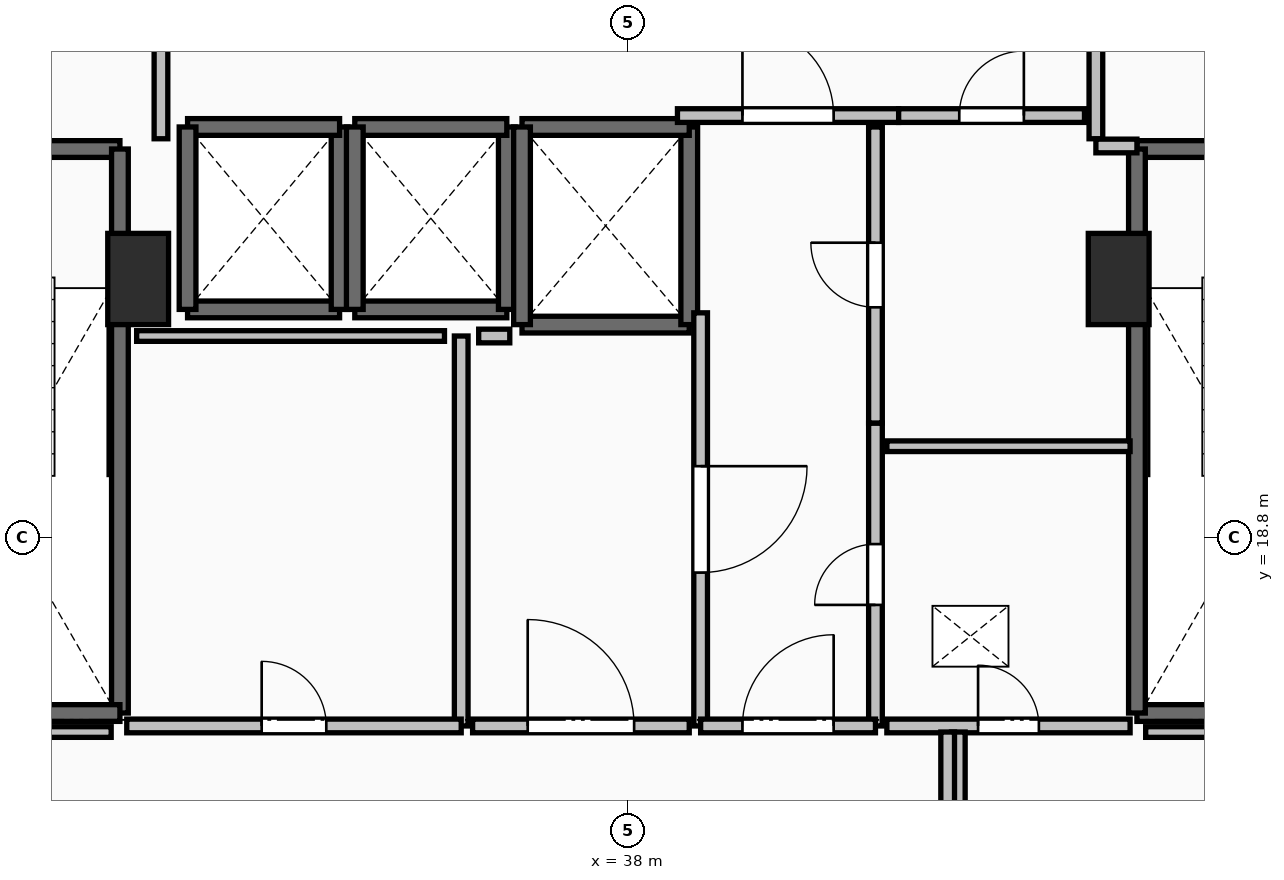
"""IFC4 building model, lengths in metres.
Left out: names, types, materials, properties, quantities, classifications, styles, units other than length and angle.
Written with IfcOpenShell. Run it as: python <this file> out.ifc"""

import sys

from ifc_helpers import new_model, si_unit, direction, frame, frame_2d, origin, origin_2d, place, context, subcontext, project, spatial, rectangle, extrude, element, fill, save


model = new_model("IFC4")
c1 = context("Model", 3, precision=1e-05, world=origin(), true_north=direction((0.0, 1.0)))
c2 = subcontext(c1, "Body", "Model", "MODEL_VIEW")
j1 = project(units=[si_unit("LENGTHUNIT", "METRE"), si_unit("PLANEANGLEUNIT", "RADIAN")], contexts=[c1])
p1 = place(None, origin())
s1 = spatial("IfcSite", under=j1, at=p1, CompositionType="ELEMENT")
p2 = place(p1, origin())
s2 = spatial("IfcBuilding", under=s1, at=p2, CompositionType="ELEMENT")
p3 = place(p2, frame((0.0, 0.0, 106.8)))
s3 = spatial("IfcBuildingStorey", under=s2, at=p3, CompositionType="ELEMENT", Elevation=106.8)
for number, where, z_axis, x_axis in (
    (1, (31.55, 22.2, 0.0), (0.0, 0.0, 1.0), (1.0, 0.0, 0.0)),
    (2, (44.45, 22.2, 0.0), (0.0, 0.0, 1.0), (1.0, 0.0, 0.0)),
):
    element("IfcColumn", number, at=place(p3, frame(where, z_axis=z_axis, x_axis=x_axis)), inside=s3, PredefinedType="PILASTER", context=c2, shape_type="SweptSolid", body=[
        extrude(rectangle(XDim=0.8, YDim=1.2, at=origin_2d()), origin(), (0.0, 0.0, 1.0), 3.5),
    ])
p4 = place(p3, frame((27.94, 23.91, 0.0), z_axis=(0.0, 0.0, 1.0), x_axis=(1.0, 0.0, 0.0)))
e3 = element("IfcWall", 3, at=p4, inside=s3, PredefinedType="SOLIDWALL", context=c2, shape_type="SweptSolid", body=[
    extrude(rectangle(XDim=3.37, YDim=0.22, at=frame_2d((1.685, 0.0))), origin(), (0.0, 0.0, 1.0), 3.24),
])
p5 = place(p4, frame((1.135, 0.0, 0.0)))
e4 = element("IfcOpeningElement", 4, at=p5, cuts=e3, PredefinedType="OPENING", context=c2, shape_type="SweptSolid", body=[
    extrude(rectangle(XDim=1.1, YDim=2.15, at=frame_2d((0.55, 1.075))), frame((0.0, 0.125, 0.0), z_axis=(0.0, -1.0, 0.0), x_axis=(1.0, 0.0, 0.0)), (0.0, 0.0, 1.0), 0.25),
])
p6 = place(p3, frame((31.31, 23.91, 0.0), z_axis=(0.0, 0.0, 1.0), x_axis=(0.0, -1.0, 0.0)))
e5 = element("IfcWall", 5, at=p6, inside=s3, PredefinedType="SOLIDWALL", context=c2, shape_type="SweptSolid", body=[
    extrude(rectangle(XDim=7.42, YDim=0.22, at=frame_2d((3.71, 0.0))), origin(), (0.0, 0.0, 1.0), 3.24),
])
p7 = place(p3, frame((31.31, 16.49, 0.0), z_axis=(0.0, 0.0, 1.0), x_axis=(-1.0, 0.0, 0.0)))
e6 = element("IfcWall", 6, at=p7, inside=s3, PredefinedType="SOLIDWALL", context=c2, shape_type="SweptSolid", body=[
    extrude(rectangle(XDim=3.37, YDim=0.22, at=frame_2d((1.685, 0.0))), origin(), (0.0, 0.0, 1.0), 3.24),
])
p8 = place(p3, frame((44.69, 23.91, 0.0), z_axis=(0.0, 0.0, 1.0), x_axis=(1.0, 0.0, 0.0)))
e7 = element("IfcWall", 7, at=p8, inside=s3, PredefinedType="SOLIDWALL", context=c2, shape_type="SweptSolid", body=[
    extrude(rectangle(XDim=3.37, YDim=0.22, at=frame_2d((1.685, 0.0))), origin(), (0.0, 0.0, 1.0), 3.24),
])
p9 = place(p8, frame((1.135, 0.0, 0.0)))
e8 = element("IfcOpeningElement", 8, at=p9, cuts=e7, PredefinedType="OPENING", context=c2, shape_type="SweptSolid", body=[
    extrude(rectangle(XDim=1.1, YDim=2.15, at=frame_2d((0.55, 1.075))), frame((0.0, 0.125, 0.0), z_axis=(0.0, -1.0, 0.0), x_axis=(1.0, 0.0, 0.0)), (0.0, 0.0, 1.0), 0.25),
])
p10 = place(p3, frame((48.06, 16.49, 0.0), z_axis=(0.0, 0.0, 1.0), x_axis=(-1.0, 0.0, 0.0)))
e9 = element("IfcWall", 9, at=p10, inside=s3, PredefinedType="SOLIDWALL", context=c2, shape_type="SweptSolid", body=[
    extrude(rectangle(XDim=3.37, YDim=0.22, at=frame_2d((1.685, 0.0))), origin(), (0.0, 0.0, 1.0), 3.24),
])
p11 = place(p3, frame((44.69, 16.49, 0.0), z_axis=(0.0, 0.0, 1.0), x_axis=(0.0, 1.0, 0.0)))
e10 = element("IfcWall", 10, at=p11, inside=s3, PredefinedType="SOLIDWALL", context=c2, shape_type="SweptSolid", body=[
    extrude(rectangle(XDim=7.42, YDim=0.22, at=frame_2d((3.71, 0.0))), origin(), (0.0, 0.0, 1.0), 3.24),
])
p12 = place(p3, frame((32.2, 21.8, 0.0), z_axis=(0.0, 0.0, 1.0), x_axis=(1.0, 0.0, 0.0)))
e11 = element("IfcWall", 11, at=p12, inside=s3, PredefinedType="SOLIDWALL", context=c2, shape_type="SweptSolid", body=[
    extrude(rectangle(XDim=2.0, YDim=0.22, at=frame_2d((1.0, 0.0))), origin(), (0.0, 0.0, 1.0), 3.24),
])
p13 = place(p3, frame((34.2, 21.8, 0.0), z_axis=(0.0, 0.0, 1.0), x_axis=(0.0, 1.0, 0.0)))
e12 = element("IfcWall", 12, at=p13, inside=s3, PredefinedType="SOLIDWALL", context=c2, shape_type="SweptSolid", body=[
    extrude(rectangle(XDim=2.4, YDim=0.22, at=frame_2d((1.2, 0.0))), origin(), (0.0, 0.0, 1.0), 3.24),
])
p14 = place(p3, frame((34.2, 24.2, 0.0), z_axis=(0.0, 0.0, 1.0), x_axis=(-1.0, 0.0, 0.0)))
e13 = element("IfcWall", 13, at=p14, inside=s3, PredefinedType="SOLIDWALL", context=c2, shape_type="SweptSolid", body=[
    extrude(rectangle(XDim=2.0, YDim=0.22, at=frame_2d((1.0, 0.0))), origin(), (0.0, 0.0, 1.0), 3.24),
])
p15 = place(p3, frame((32.2, 24.2, 0.0), z_axis=(0.0, 0.0, 1.0), x_axis=(0.0, -1.0, 0.0)))
e14 = element("IfcWall", 14, at=p15, inside=s3, PredefinedType="SOLIDWALL", context=c2, shape_type="SweptSolid", body=[
    extrude(rectangle(XDim=2.4, YDim=0.22, at=frame_2d((1.2, 0.0))), origin(), (0.0, 0.0, 1.0), 3.24),
])
p16 = place(p3, frame((34.4, 21.8, 0.0), z_axis=(0.0, 0.0, 1.0), x_axis=(1.0, 0.0, 0.0)))
e15 = element("IfcWall", 15, at=p16, inside=s3, PredefinedType="SOLIDWALL", context=c2, shape_type="SweptSolid", body=[
    extrude(rectangle(XDim=2.0, YDim=0.22, at=frame_2d((1.0, 0.0))), origin(), (0.0, 0.0, 1.0), 3.24),
])
p17 = place(p3, frame((36.4, 21.8, 0.0), z_axis=(0.0, 0.0, 1.0), x_axis=(0.0, 1.0, 0.0)))
e16 = element("IfcWall", 16, at=p17, inside=s3, PredefinedType="SOLIDWALL", context=c2, shape_type="SweptSolid", body=[
    extrude(rectangle(XDim=2.4, YDim=0.22, at=frame_2d((1.2, 0.0))), origin(), (0.0, 0.0, 1.0), 3.24),
])
p18 = place(p3, frame((36.4, 24.2, 0.0), z_axis=(0.0, 0.0, 1.0), x_axis=(-1.0, 0.0, 0.0)))
e17 = element("IfcWall", 17, at=p18, inside=s3, PredefinedType="SOLIDWALL", context=c2, shape_type="SweptSolid", body=[
    extrude(rectangle(XDim=2.0, YDim=0.22, at=frame_2d((1.0, 0.0))), origin(), (0.0, 0.0, 1.0), 3.24),
])
p19 = place(p3, frame((34.4, 24.2, 0.0), z_axis=(0.0, 0.0, 1.0), x_axis=(0.0, -1.0, 0.0)))
e18 = element("IfcWall", 18, at=p19, inside=s3, PredefinedType="SOLIDWALL", context=c2, shape_type="SweptSolid", body=[
    extrude(rectangle(XDim=2.4, YDim=0.22, at=frame_2d((1.2, 0.0))), origin(), (0.0, 0.0, 1.0), 3.24),
])
p20 = place(p3, frame((36.6, 21.6, 0.0), z_axis=(0.0, 0.0, 1.0), x_axis=(1.0, 0.0, 0.0)))
e19 = element("IfcWall", 19, at=p20, inside=s3, PredefinedType="SOLIDWALL", context=c2, shape_type="SweptSolid", body=[
    extrude(rectangle(XDim=2.2, YDim=0.22, at=frame_2d((1.1, 0.0))), origin(), (0.0, 0.0, 1.0), 3.24),
])
p21 = place(p3, frame((38.8, 21.6, 0.0), z_axis=(0.0, 0.0, 1.0), x_axis=(0.0, 1.0, 0.0)))
e20 = element("IfcWall", 20, at=p21, inside=s3, PredefinedType="SOLIDWALL", context=c2, shape_type="SweptSolid", body=[
    extrude(rectangle(XDim=2.6, YDim=0.22, at=frame_2d((1.3, 0.0))), origin(), (0.0, 0.0, 1.0), 3.24),
])
p22 = place(p3, frame((38.8, 24.2, 0.0), z_axis=(0.0, 0.0, 1.0), x_axis=(-1.0, 0.0, 0.0)))
e21 = element("IfcWall", 21, at=p22, inside=s3, PredefinedType="SOLIDWALL", context=c2, shape_type="SweptSolid", body=[
    extrude(rectangle(XDim=2.2, YDim=0.22, at=frame_2d((1.1, 0.0))), origin(), (0.0, 0.0, 1.0), 3.24),
])
p23 = place(p3, frame((36.6, 24.2, 0.0), z_axis=(0.0, 0.0, 1.0), x_axis=(0.0, -1.0, 0.0)))
e22 = element("IfcWall", 22, at=p23, inside=s3, PredefinedType="SOLIDWALL", context=c2, shape_type="SweptSolid", body=[
    extrude(rectangle(XDim=2.6, YDim=0.22, at=frame_2d((1.3, 0.0))), origin(), (0.0, 0.0, 1.0), 3.24),
])
p24 = place(p3, frame((31.85, 24.045, 0.0), z_axis=(0.0, 0.0, 1.0), x_axis=(0.0, 1.0, 0.0)))
e23 = element("IfcWall", 23, at=p24, inside=s3, PredefinedType="PARTITIONING", context=c2, shape_type="SweptSolid", body=[
    extrude(rectangle(XDim=3.91, YDim=0.18, at=frame_2d((1.955, 0.0))), origin(), (0.0, 0.0, 1.0), 3.24),
])
p25 = place(p24, frame((1.355, 0.0, 0.0)))
e24 = element("IfcOpeningElement", 24, at=p25, cuts=e23, PredefinedType="OPENING", context=c2, shape_type="SweptSolid", body=[
    extrude(rectangle(XDim=1.2, YDim=2.15, at=frame_2d((0.6, 1.075))), frame((0.0, 0.105, 0.0), z_axis=(0.0, -1.0, 0.0), x_axis=(1.0, 0.0, 0.0)), (0.0, 0.0, 1.0), 0.21),
])
p26 = place(p3, frame((44.15, 27.955, 0.0), z_axis=(0.0, 0.0, 1.0), x_axis=(0.0, -1.0, 0.0)))
e25 = element("IfcWall", 25, at=p26, inside=s3, PredefinedType="PARTITIONING", context=c2, shape_type="SweptSolid", body=[
    extrude(rectangle(XDim=3.91, YDim=0.18, at=frame_2d((1.955, 0.0))), origin(), (0.0, 0.0, 1.0), 3.24),
])
p27 = place(p26, frame((1.355, 0.0, 0.0)))
e26 = element("IfcOpeningElement", 26, at=p27, cuts=e25, PredefinedType="OPENING", context=c2, shape_type="SweptSolid", body=[
    extrude(rectangle(XDim=1.2, YDim=2.15, at=frame_2d((0.6, 1.075))), frame((0.0, 0.105, 0.0), z_axis=(0.0, -1.0, 0.0), x_axis=(1.0, 0.0, 0.0)), (0.0, 0.0, 1.0), 0.21),
])
p28 = place(p3, frame((44.15, 23.95, 0.0), z_axis=(0.0, 0.0, 1.0), x_axis=(1.0, 0.0, 0.0)))
e27 = element("IfcWall", 27, at=p28, inside=s3, PredefinedType="PARTITIONING", context=c2, shape_type="SweptSolid", body=[
    extrude(rectangle(XDim=0.54, YDim=0.18, at=frame_2d((0.27, 0.0))), origin(), (0.0, 0.0, 1.0), 3.24),
])
p29 = place(p3, frame((38.645, 24.35, 0.0), z_axis=(0.0, 0.0, 1.0), x_axis=(1.0, 0.0, 0.0)))
e28 = element("IfcWall", 28, at=p29, inside=s3, PredefinedType="PARTITIONING", context=c2, shape_type="SweptSolid", body=[
    extrude(rectangle(XDim=2.91, YDim=0.18, at=frame_2d((1.455, 0.0))), origin(), (0.0, 0.0, 1.0), 3.24),
])
p30 = place(p29, frame((0.855, 0.0, 0.0)))
e29 = element("IfcOpeningElement", 29, at=p30, cuts=e28, PredefinedType="OPENING", context=c2, shape_type="SweptSolid", body=[
    extrude(rectangle(XDim=1.2, YDim=2.15, at=frame_2d((0.6, 1.075))), frame((0.0, 0.105, 0.0), z_axis=(0.0, -1.0, 0.0), x_axis=(1.0, 0.0, 0.0)), (0.0, 0.0, 1.0), 0.21),
])
p31 = place(p3, frame((41.555, 24.35, 0.0), z_axis=(0.0, 0.0, 1.0), x_axis=(1.0, 0.0, 0.0)))
e30 = element("IfcWall", 30, at=p31, inside=s3, PredefinedType="PARTITIONING", context=c2, shape_type="SweptSolid", body=[
    extrude(rectangle(XDim=2.445, YDim=0.18, at=frame_2d((1.223, 0.0))), origin(), (0.0, 0.0, 1.0), 3.24),
])
p32 = place(p31, frame((0.798, 0.0, 0.0)))
e31 = element("IfcOpeningElement", 31, at=p32, cuts=e30, PredefinedType="OPENING", context=c2, shape_type="SweptSolid", body=[
    extrude(rectangle(XDim=0.85, YDim=2.1, at=frame_2d((0.425, 1.05))), frame((0.0, 0.105, 0.0), z_axis=(0.0, -1.0, 0.0), x_axis=(1.0, 0.0, 0.0)), (0.0, 0.0, 1.0), 0.21),
])
p33 = place(p3, frame((41.25, 16.32, 0.0), z_axis=(0.0, 0.0, 1.0), x_axis=(0.0, 1.0, 0.0)))
e32 = element("IfcWall", 32, at=p33, inside=s3, PredefinedType="PARTITIONING", context=c2, shape_type="SweptSolid", body=[
    extrude(rectangle(XDim=3.985, YDim=0.18, at=frame_2d((1.992, 0.0))), origin(), (0.0, 0.0, 1.0), 3.24),
])
p34 = place(p33, frame((1.593, 0.0, 0.0)))
e33 = element("IfcOpeningElement", 33, at=p34, cuts=e32, PredefinedType="OPENING", context=c2, shape_type="SweptSolid", body=[
    extrude(rectangle(XDim=0.8, YDim=2.05, at=frame_2d((0.4, 1.025))), frame((0.0, 0.105, 0.0), z_axis=(0.0, -1.0, 0.0), x_axis=(1.0, 0.0, 0.0)), (0.0, 0.0, 1.0), 0.21),
])
p35 = place(p3, frame((41.25, 20.305, 0.0), z_axis=(0.0, 0.0, 1.0), x_axis=(0.0, 1.0, 0.0)))
e34 = element("IfcWall", 34, at=p35, inside=s3, PredefinedType="PARTITIONING", context=c2, shape_type="SweptSolid", body=[
    extrude(rectangle(XDim=3.895, YDim=0.18, at=frame_2d((1.948, 0.0))), origin(), (0.0, 0.0, 1.0), 3.24),
])
p36 = place(p35, frame((1.522, 0.0, 0.0)))
e35 = element("IfcOpeningElement", 35, at=p36, cuts=e34, PredefinedType="OPENING", context=c2, shape_type="SweptSolid", body=[
    extrude(rectangle(XDim=0.85, YDim=2.1, at=frame_2d((0.425, 1.05))), frame((0.0, 0.105, 0.0), z_axis=(0.0, -1.0, 0.0), x_axis=(1.0, 0.0, 0.0)), (0.0, 0.0, 1.0), 0.21),
])
p37 = place(p3, frame((38.95, 21.755, 0.0), z_axis=(0.0, 0.0, 1.0), x_axis=(0.0, -1.0, 0.0)))
e36 = element("IfcWall", 36, at=p37, inside=s3, PredefinedType="PARTITIONING", context=c2, shape_type="SweptSolid", body=[
    extrude(rectangle(XDim=5.435, YDim=0.18, at=frame_2d((2.717, 0.0))), origin(), (0.0, 0.0, 1.0), 3.24),
])
p38 = place(p37, frame((2.018, 0.0, 0.0)))
e37 = element("IfcOpeningElement", 37, at=p38, cuts=e36, PredefinedType="OPENING", context=c2, shape_type="SweptSolid", body=[
    extrude(rectangle(XDim=1.4, YDim=2.2, at=frame_2d((0.7, 1.1))), frame((0.0, 0.105, 0.0), z_axis=(0.0, -1.0, 0.0), x_axis=(1.0, 0.0, 0.0)), (0.0, 0.0, 1.0), 0.21),
])
p39 = place(p3, frame((38.95, 16.32, 0.0), z_axis=(0.0, 0.0, 1.0), x_axis=(1.0, 0.0, 0.0)))
e38 = element("IfcWall", 38, at=p39, inside=s3, PredefinedType="PARTITIONING", context=c2, shape_type="SweptSolid", body=[
    extrude(rectangle(XDim=2.3, YDim=0.18, at=frame_2d((1.15, 0.0))), origin(), (0.0, 0.0, 1.0), 3.24),
])
p40 = place(p39, frame((0.55, 0.0, 0.0)))
e39 = element("IfcOpeningElement", 39, at=p40, cuts=e38, PredefinedType="OPENING", context=c2, shape_type="SweptSolid", body=[
    extrude(rectangle(XDim=1.2, YDim=2.15, at=frame_2d((0.6, 1.075))), frame((0.0, 0.105, 0.0), z_axis=(0.0, -1.0, 0.0), x_axis=(1.0, 0.0, 0.0)), (0.0, 0.0, 1.0), 0.21),
])
p41 = place(p3, frame((44.6, 20.0, 0.0), z_axis=(0.0, 0.0, 1.0), x_axis=(-1.0, 0.0, 0.0)))
e40 = element("IfcWall", 40, at=p41, inside=s3, PredefinedType="PARTITIONING", context=c2, shape_type="SweptSolid", body=[
    extrude(rectangle(XDim=3.2, YDim=0.14, at=frame_2d((1.6, 0.0))), origin(), (0.0, 0.0, 1.0), 3.24),
])
p42 = place(p3, frame((41.4, 16.32, 0.0), z_axis=(0.0, 0.0, 1.0), x_axis=(1.0, 0.0, 0.0)))
e41 = element("IfcWall", 41, at=p42, inside=s3, PredefinedType="PARTITIONING", context=c2, shape_type="SweptSolid", body=[
    extrude(rectangle(XDim=3.2, YDim=0.18, at=frame_2d((1.6, 0.0))), origin(), (0.0, 0.0, 1.0), 3.24),
])
p43 = place(p42, frame((1.2, 0.0, 0.0)))
e42 = element("IfcOpeningElement", 42, at=p43, cuts=e41, PredefinedType="OPENING", context=c2, shape_type="SweptSolid", body=[
    extrude(rectangle(XDim=0.8, YDim=2.05, at=frame_2d((0.4, 1.025))), frame((0.0, 0.105, 0.0), z_axis=(0.0, -1.0, 0.0), x_axis=(1.0, 0.0, 0.0)), (0.0, 0.0, 1.0), 0.21),
])
p44 = place(p3, frame((35.8, 16.32, 0.0), z_axis=(0.0, 0.0, 1.0), x_axis=(0.0, 1.0, 0.0)))
e43 = element("IfcWall", 43, at=p44, inside=s3, PredefinedType="PARTITIONING", context=c2, shape_type="SweptSolid", body=[
    extrude(rectangle(XDim=5.13, YDim=0.18, at=frame_2d((2.565, 0.0))), origin(), (0.0, 0.0, 1.0), 3.24),
])
p45 = place(p3, frame((31.4, 16.32, 0.0), z_axis=(0.0, 0.0, 1.0), x_axis=(1.0, 0.0, 0.0)))
e44 = element("IfcWall", 44, at=p45, inside=s3, PredefinedType="PARTITIONING", context=c2, shape_type="SweptSolid", body=[
    extrude(rectangle(XDim=4.4, YDim=0.18, at=frame_2d((2.2, 0.0))), origin(), (0.0, 0.0, 1.0), 3.24),
])
p46 = place(p45, frame((1.775, 0.0, 0.0)))
e45 = element("IfcOpeningElement", 45, at=p46, cuts=e44, PredefinedType="OPENING", context=c2, shape_type="SweptSolid", body=[
    extrude(rectangle(XDim=0.85, YDim=2.1, at=frame_2d((0.425, 1.05))), frame((0.0, 0.105, 0.0), z_axis=(0.0, -1.0, 0.0), x_axis=(1.0, 0.0, 0.0)), (0.0, 0.0, 1.0), 0.21),
])
p47 = place(p3, frame((35.95, 16.32, 0.0), z_axis=(0.0, 0.0, 1.0), x_axis=(1.0, 0.0, 0.0)))
e46 = element("IfcWall", 46, at=p47, inside=s3, PredefinedType="PARTITIONING", context=c2, shape_type="SweptSolid", body=[
    extrude(rectangle(XDim=2.85, YDim=0.18, at=frame_2d((1.425, 0.0))), origin(), (0.0, 0.0, 1.0), 3.24),
])
p48 = place(p47, frame((0.725, 0.0, 0.0)))
e47 = element("IfcOpeningElement", 47, at=p48, cuts=e46, PredefinedType="OPENING", context=c2, shape_type="SweptSolid", body=[
    extrude(rectangle(XDim=1.4, YDim=2.2, at=frame_2d((0.7, 1.1))), frame((0.0, 0.105, 0.0), z_axis=(0.0, -1.0, 0.0), x_axis=(1.0, 0.0, 0.0)), (0.0, 0.0, 1.0), 0.21),
])
for number, where, z_axis, x_axis in (
    (48, (42.34, 16.24, 0.0), (0.0, 0.0, 1.0), (0.0, -1.0, 0.0)),
    (49, (42.2, 14.1, 0.0), (0.0, 0.0, 1.0), (0.0, 1.0, 0.0)),
):
    element("IfcWall", number, at=place(p3, frame(where, z_axis=z_axis, x_axis=x_axis)), inside=s3, PredefinedType="PARTITIONING", context=c2, shape_type="SweptSolid", body=[
        extrude(rectangle(XDim=2.14, YDim=0.18, at=frame_2d((1.07, 0.0))), origin(), (0.0, 0.0, 1.0), 3.24),
    ])
p49 = place(p3, frame((35.58, 21.45, 0.0), z_axis=(0.0, 0.0, 1.0), x_axis=(-1.0, 0.0, 0.0)))
e50 = element("IfcWall", 50, at=p49, inside=s3, PredefinedType="PARTITIONING", context=c2, shape_type="SweptSolid", body=[
    extrude(rectangle(XDim=4.05, YDim=0.14, at=frame_2d((2.025, 0.0))), origin(), (0.0, 0.0, 1.0), 3.24),
])
p50 = place(p3, frame((36.439, 21.45, 0.0), z_axis=(0.0, 0.0, 1.0), x_axis=(-1.0, 0.0, 0.0)))
e51 = element("IfcWall", 51, at=p50, inside=s3, PredefinedType="PARTITIONING", context=c2, shape_type="SweptSolid", body=[
    extrude(rectangle(XDim=0.409, YDim=0.18, at=frame_2d((0.205, 0.0))), origin(), (0.0, 0.0, 1.0), 3.24),
])
for number, where, z_axis, x_axis in (
    (52, (48.55, 16.24, 0.0), (0.0, 0.0, 1.0), (-1.0, 0.0, 0.0)),
    (53, (31.195, 16.24, 0.0), (0.0, 0.0, 1.0), (-1.0, 0.0, 0.0)),
):
    element("IfcWall", number, at=place(p3, frame(where, z_axis=z_axis, x_axis=x_axis)), inside=s3, PredefinedType="PARTITIONING", context=c2, shape_type="SweptSolid", body=[
        extrude(rectangle(XDim=3.745, YDim=0.14, at=frame_2d((1.873, 0.0))), origin(), (0.0, 0.0, 1.0), 2.432),
    ])
p51 = place(p30, origin())
e54 = element("IfcDoor", 54, at=p51, inside=s3, OperationType="SINGLE_SWING_LEFT", PredefinedType="DOOR", context=c2, shape_type="SweptSolid", body=[
    extrude(rectangle(XDim=1.2, YDim=2.15, at=frame_2d((0.6, 1.075))), frame((0.0, 0.025, 0.0), z_axis=(0.0, -1.0, 0.0), x_axis=(1.0, 0.0, 0.0)), (0.0, 0.0, 1.0), 0.05),
])
fill(e29, e54)
p52 = place(p32, origin())
e55 = element("IfcDoor", 55, at=p52, inside=s3, OperationType="SINGLE_SWING_RIGHT", PredefinedType="DOOR", context=c2, shape_type="SweptSolid", body=[
    extrude(rectangle(XDim=0.85, YDim=2.1, at=frame_2d((0.425, 1.05))), frame((0.0, 0.025, 0.0), z_axis=(0.0, -1.0, 0.0), x_axis=(1.0, 0.0, 0.0)), (0.0, 0.0, 1.0), 0.05),
])
fill(e31, e55)
p53 = place(p34, origin())
e56 = element("IfcDoor", 56, at=p53, inside=s3, OperationType="SINGLE_SWING_LEFT", PredefinedType="DOOR", context=c2, shape_type="SweptSolid", body=[
    extrude(rectangle(XDim=0.8, YDim=2.05, at=frame_2d((0.4, 1.025))), frame((0.0, 0.025, 0.0), z_axis=(0.0, -1.0, 0.0), x_axis=(1.0, 0.0, 0.0)), (0.0, 0.0, 1.0), 0.05),
])
fill(e33, e56)
p54 = place(p36, origin())
e57 = element("IfcDoor", 57, at=p54, inside=s3, OperationType="SINGLE_SWING_RIGHT", PredefinedType="DOOR", context=c2, shape_type="SweptSolid", body=[
    extrude(rectangle(XDim=0.85, YDim=2.1, at=frame_2d((0.425, 1.05))), frame((0.0, 0.025, 0.0), z_axis=(0.0, -1.0, 0.0), x_axis=(1.0, 0.0, 0.0)), (0.0, 0.0, 1.0), 0.05),
])
fill(e35, e57)
p55 = place(p38, origin())
e58 = element("IfcDoor", 58, at=p55, inside=s3, OperationType="DOUBLE_SWING_LEFT", PredefinedType="DOOR", context=c2, shape_type="SweptSolid", body=[
    extrude(rectangle(XDim=1.4, YDim=2.2, at=frame_2d((0.7, 1.1))), frame((0.0, 0.025, 0.0), z_axis=(0.0, -1.0, 0.0), x_axis=(1.0, 0.0, 0.0)), (0.0, 0.0, 1.0), 0.05),
])
fill(e37, e58)
p56 = place(p40, origin())
e59 = element("IfcDoor", 59, at=p56, inside=s3, OperationType="SINGLE_SWING_RIGHT", PredefinedType="DOOR", context=c2, shape_type="SweptSolid", body=[
    extrude(rectangle(XDim=1.2, YDim=2.15, at=frame_2d((0.6, 1.075))), frame((0.0, 0.025, 0.0), z_axis=(0.0, -1.0, 0.0), x_axis=(1.0, 0.0, 0.0)), (0.0, 0.0, 1.0), 0.05),
])
fill(e39, e59)
p57 = place(p43, origin())
e60 = element("IfcDoor", 60, at=p57, inside=s3, OperationType="SINGLE_SWING_LEFT", PredefinedType="DOOR", context=c2, shape_type="SweptSolid", body=[
    extrude(rectangle(XDim=0.8, YDim=2.05, at=frame_2d((0.4, 1.025))), frame((0.0, 0.025, 0.0), z_axis=(0.0, -1.0, 0.0), x_axis=(1.0, 0.0, 0.0)), (0.0, 0.0, 1.0), 0.05),
])
fill(e42, e60)
p58 = place(p46, origin())
e61 = element("IfcDoor", 61, at=p58, inside=s3, OperationType="SINGLE_SWING_LEFT", PredefinedType="DOOR", context=c2, shape_type="SweptSolid", body=[
    extrude(rectangle(XDim=0.85, YDim=2.1, at=frame_2d((0.425, 1.05))), frame((0.0, 0.025, 0.0), z_axis=(0.0, -1.0, 0.0), x_axis=(1.0, 0.0, 0.0)), (0.0, 0.0, 1.0), 0.05),
])
fill(e45, e61)
p59 = place(p48, origin())
e62 = element("IfcDoor", 62, at=p59, inside=s3, OperationType="DOUBLE_SWING_LEFT", PredefinedType="DOOR", context=c2, shape_type="SweptSolid", body=[
    extrude(rectangle(XDim=1.4, YDim=2.2, at=frame_2d((0.7, 1.1))), frame((0.0, 0.025, 0.0), z_axis=(0.0, -1.0, 0.0), x_axis=(1.0, 0.0, 0.0)), (0.0, 0.0, 1.0), 0.05),
])
fill(e47, e62)
save(model, sys.argv[1])
